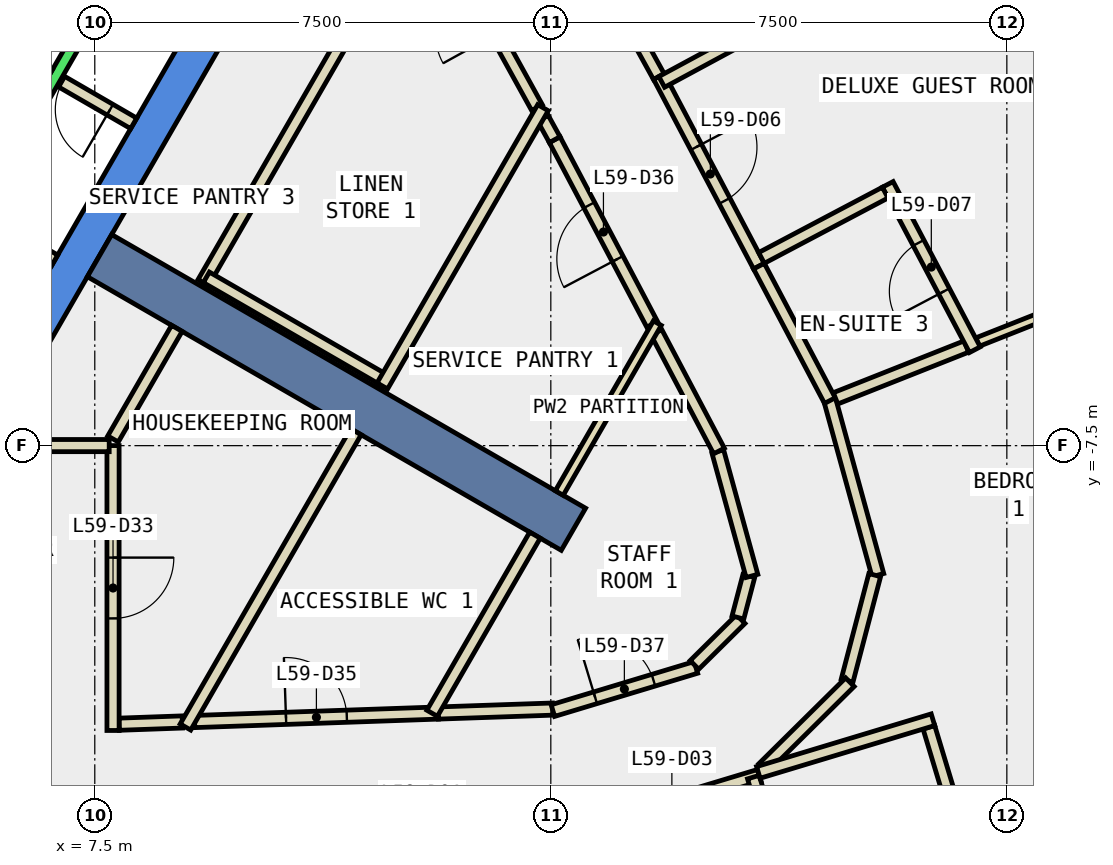
"""IFC4 building model, lengths in metres.
Left out: names, types, materials, properties, quantities, classifications, styles, units other than length and angle.
Written with IfcOpenShell. Run it as: python <this file> out.ifc"""

import sys

from ifc_helpers import new_model, si_unit, direction, frame, frame_2d, origin, origin_2d, place, context, subcontext, project, spatial, polyline, rectangle, outline, extrude, element, fill, save


model = new_model("IFC4")
c1 = context("Model", 3, precision=1e-05, world=origin(), true_north=direction((0.0, 1.0)))
c2 = subcontext(c1, "Body", "Model", "MODEL_VIEW")
j1 = project(units=[si_unit("LENGTHUNIT", "METRE"), si_unit("PLANEANGLEUNIT", "RADIAN")], contexts=[c1])
p1 = place(None, origin())
s1 = spatial("IfcSite", under=j1, at=p1, CompositionType="ELEMENT")
p2 = place(p1, origin())
s2 = spatial("IfcBuilding", under=s1, at=p2, CompositionType="ELEMENT")
p3 = place(p2, frame((0.0, 0.0, 259.4)))
s3 = spatial("IfcBuildingStorey", under=s2, at=p3, CompositionType="ELEMENT", Elevation=259.4)
p4 = place(p3, frame((23.856, -13.774, -0.34), z_axis=(0.0, 0.0, 1.0), x_axis=(-0.866025403784, 0.5, 0.0)))
e1 = element("IfcColumn", 1, at=p4, inside=s3, PredefinedType="COLUMN", context=c2, shape_type="SweptSolid", body=[
    extrude(rectangle(XDim=1.8, YDim=1.8, at=origin_2d()), origin(), (0.0, 0.0, 1.0), 3.6),
])
p5 = place(p3, frame((0.0, 0.0, -0.34)))
e2 = element("IfcWall", 2, at=p5, inside=s3, PredefinedType="SHEAR", context=c2, shape_type="SweptSolid", body=[
    extrude(outline(polyline([(5.774, -7.5), (11.547, 2.5), (10.854, 2.5), (5.427, -6.9), (5.774, -7.5)])), origin(), (0.0, 0.0, 1.0), 3.6),
])
p6 = place(p3, frame((7.578, -4.375, -0.34), z_axis=(0.0, 0.0, 1.0), x_axis=(0.866024315419, -0.5000018851, 0.0)))
e3 = element("IfcWall", 3, at=p6, inside=s3, PredefinedType="SHEAR", context=c2, shape_type="SweptSolid", body=[
    extrude(rectangle(XDim=9.0, YDim=0.8, at=frame_2d((4.5, 0.0))), origin(), (0.0, 0.0, 1.0), 3.6),
])
p7 = place(p3, frame((25.012, -4.07, 0.0), z_axis=(0.0, 0.0, 1.0), x_axis=(-0.466663589714, 0.884434900959, 0.0)))
e4 = element("IfcWall", 4, at=p7, inside=s3, PredefinedType="STANDARD", context=c2, shape_type="SweptSolid", body=[
    extrude(rectangle(XDim=5.638, YDim=0.3, at=frame_2d((2.819, 0.0))), origin(), (0.0, 0.0, 1.0), 3.26),
])
p8 = place(p7, frame((0.459, 0.0, 0.9)))
e5 = element("IfcOpeningElement", 5, at=p8, cuts=e4, PredefinedType="OPENING", context=c2, shape_type="SweptSolid", body=[
    extrude(rectangle(XDim=1.9, YDim=2.0, at=frame_2d((0.95, 1.0))), frame((0.0, 0.16, 0.0), z_axis=(0.0, -1.0, 0.0), x_axis=(1.0, 0.0, 0.0)), (0.0, 0.0, 1.0), 0.32),
])
p9 = place(p7, frame((3.278, 0.0, 0.9)))
e6 = element("IfcOpeningElement", 6, at=p9, cuts=e4, PredefinedType="OPENING", context=c2, shape_type="SweptSolid", body=[
    extrude(rectangle(XDim=1.9, YDim=2.0, at=frame_2d((0.95, 1.0))), frame((0.0, 0.16, 0.0), z_axis=(0.0, -1.0, 0.0), x_axis=(1.0, 0.0, 0.0)), (0.0, 0.0, 1.0), 0.32),
])
p10 = place(p3, frame((7.9, -12.081, 0.0), z_axis=(0.0, 0.0, 1.0), x_axis=(0.999365240621, 0.035624652105, 0.0)))
e7 = element("IfcWall", 7, at=p10, inside=s3, PredefinedType="PARTITIONING", context=c2, shape_type="SweptSolid", body=[
    extrude(rectangle(XDim=1.042, YDim=0.2, at=frame_2d((0.521, 0.0))), origin(), (0.0, 0.0, 1.0), 3.26),
])
p11 = place(p3, frame((14.773, -1.941, 0.0), z_axis=(0.0, 0.0, 1.0), x_axis=(-0.483431586589, 0.875382145744, 0.0)))
e8 = element("IfcWall", 8, at=p11, inside=s3, PredefinedType="PARTITIONING", context=c2, shape_type="SweptSolid", body=[
    extrude(rectangle(XDim=3.771, YDim=0.2, at=frame_2d((1.885, 0.0))), origin(), (0.0, 0.0, 1.0), 3.26),
])
p12 = place(p11, frame((1.385, 0.0, 0.0)))
e9 = element("IfcOpeningElement", 9, at=p12, cuts=e8, PredefinedType="OPENING", context=c2, shape_type="SweptSolid", body=[
    extrude(rectangle(XDim=1.0, YDim=2.1, at=frame_2d((0.5, 1.05))), frame((0.0, 0.11, 0.0), z_axis=(0.0, -1.0, 0.0), x_axis=(1.0, 0.0, 0.0)), (0.0, 0.0, 1.0), 0.22),
])
p13 = place(p3, frame((9.141, -12.037, 0.0), z_axis=(0.0, 0.0, 1.0), x_axis=(0.999388955878, 0.034953038062, 0.0)))
e10 = element("IfcWall", 10, at=p13, inside=s3, PredefinedType="PARTITIONING", context=c2, shape_type="SweptSolid", body=[
    extrude(rectangle(XDim=4.009, YDim=0.2, at=frame_2d((2.005, 0.0))), origin(), (0.0, 0.0, 1.0), 3.26),
])
p14 = place(p13, frame((1.505, 0.0, 0.0)))
e11 = element("IfcOpeningElement", 11, at=p14, cuts=e10, PredefinedType="OPENING", context=c2, shape_type="SweptSolid", body=[
    extrude(rectangle(XDim=1.0, YDim=2.1, at=frame_2d((0.5, 1.05))), frame((0.0, 0.11, 0.0), z_axis=(0.0, -1.0, 0.0), x_axis=(1.0, 0.0, 0.0)), (0.0, 0.0, 1.0), 0.22),
])
p15 = place(p3, frame((16.667, -5.505, 0.0), z_axis=(0.0, 0.0, 1.0), x_axis=(-0.466812680399, 0.884356218624, 0.0)))
e12 = element("IfcWall", 12, at=p15, inside=s3, PredefinedType="PARTITIONING", context=c2, shape_type="SweptSolid", body=[
    extrude(rectangle(XDim=3.434, YDim=0.2, at=frame_2d((1.717, 0.0))), origin(), (0.0, 0.0, 1.0), 3.26),
])
p16 = place(p15, frame((1.217, 0.0, 0.0)))
e13 = element("IfcOpeningElement", 13, at=p16, cuts=e12, PredefinedType="OPENING", context=c2, shape_type="SweptSolid", body=[
    extrude(rectangle(XDim=1.0, YDim=2.1, at=frame_2d((0.5, 1.05))), frame((0.0, 0.11, 0.0), z_axis=(0.0, -1.0, 0.0), x_axis=(1.0, 0.0, 0.0)), (0.0, 0.0, 1.0), 0.22),
])
p17 = place(p3, frame((15.064, -2.468, 0.0), z_axis=(0.0, 0.0, 1.0), x_axis=(-0.482338449744, 0.875984942735, 0.0)))
e14 = element("IfcWall", 14, at=p17, inside=s3, PredefinedType="PARTITIONING", context=c2, shape_type="SweptSolid", body=[
    extrude(rectangle(XDim=0.402, YDim=0.2, at=frame_2d((0.201, 0.0))), origin(), (0.0, 0.0, 1.0), 3.26),
])
p18 = place(p3, frame((13.148, -11.897, 0.0), z_axis=(0.0, 0.0, 1.0), x_axis=(0.999405229262, 0.034484601243, 0.0)))
e15 = element("IfcWall", 15, at=p18, inside=s3, PredefinedType="PARTITIONING", context=c2, shape_type="SweptSolid", body=[
    extrude(rectangle(XDim=1.883, YDim=0.2, at=frame_2d((0.942, 0.0))), origin(), (0.0, 0.0, 1.0), 3.26),
])
p19 = place(p3, frame((15.034, -11.857, 0.0), z_axis=(0.0, 0.0, 1.0), x_axis=(0.957338084933, 0.288970225346, 0.0)))
e16 = element("IfcWall", 16, at=p19, inside=s3, PredefinedType="PARTITIONING", context=c2, shape_type="SweptSolid", body=[
    extrude(rectangle(XDim=2.457, YDim=0.2, at=frame_2d((1.229, 0.0))), origin(), (0.0, 0.0, 1.0), 3.26),
])
p20 = place(p19, frame((0.728, 0.0, 0.0)))
e17 = element("IfcOpeningElement", 17, at=p20, cuts=e16, PredefinedType="OPENING", context=c2, shape_type="SweptSolid", body=[
    extrude(rectangle(XDim=1.0, YDim=2.1, at=frame_2d((0.5, 1.05))), frame((0.0, 0.11, 0.0), z_axis=(0.0, -1.0, 0.0), x_axis=(1.0, 0.0, 0.0)), (0.0, 0.0, 1.0), 0.22),
])
p21 = place(p3, frame((17.362, -11.106, 0.0), z_axis=(0.0, 0.0, 1.0), x_axis=(0.710859741153, 0.703333795866, 0.0)))
e18 = element("IfcWall", 18, at=p21, inside=s3, PredefinedType="PARTITIONING", context=c2, shape_type="SweptSolid", body=[
    extrude(rectangle(XDim=1.071, YDim=0.2, at=frame_2d((0.535, 0.0))), origin(), (0.0, 0.0, 1.0), 3.26),
])
p22 = place(p3, frame((18.077, -10.326, 0.0), z_axis=(0.0, 0.0, 1.0), x_axis=(0.254782174857, 0.966998471237, 0.0)))
e19 = element("IfcWall", 19, at=p22, inside=s3, PredefinedType="PARTITIONING", context=c2, shape_type="SweptSolid", body=[
    extrude(rectangle(XDim=0.707, YDim=0.2, at=frame_2d((0.354, 0.0))), origin(), (0.0, 0.0, 1.0), 3.26),
])
p23 = place(p3, frame((18.308, -9.642, 0.0), z_axis=(0.0, 0.0, 1.0), x_axis=(-0.264859637197, 0.96428697626, 0.0)))
e20 = element("IfcWall", 20, at=p23, inside=s3, PredefinedType="PARTITIONING", context=c2, shape_type="SweptSolid", body=[
    extrude(rectangle(XDim=2.122, YDim=0.2, at=frame_2d((1.061, 0.0))), origin(), (0.0, 0.0, 1.0), 3.26),
])
p24 = place(p3, frame((17.766, -7.588, 0.0), z_axis=(0.0, 0.0, 1.0), x_axis=(-0.466727344864, 0.884401258228, 0.0)))
e21 = element("IfcWall", 21, at=p24, inside=s3, PredefinedType="PARTITIONING", context=c2, shape_type="SweptSolid", body=[
    extrude(rectangle(XDim=2.205, YDim=0.2, at=frame_2d((1.103, 0.0))), origin(), (0.0, 0.0, 1.0), 3.26),
])
p25 = place(p3, frame((18.427, -12.922, 0.0), z_axis=(0.0, 0.0, 1.0), x_axis=(-0.957336631432, -0.288975040651, 0.0)))
e22 = element("IfcWall", 22, at=p25, inside=s3, PredefinedType="PARTITIONING", context=c2, shape_type="SweptSolid", body=[
    extrude(rectangle(XDim=3.0, YDim=0.2, at=frame_2d((1.5, 0.0))), origin(), (0.0, 0.0, 1.0), 3.26),
])
p26 = place(p25, frame((1.0, 0.0, 0.0)))
e23 = element("IfcOpeningElement", 23, at=p26, cuts=e22, PredefinedType="OPENING", context=c2, shape_type="SweptSolid", body=[
    extrude(rectangle(XDim=1.0, YDim=2.1, at=frame_2d((0.5, 1.05))), frame((0.0, 0.11, 0.0), z_axis=(0.0, -1.0, 0.0), x_axis=(1.0, 0.0, 0.0)), (0.0, 0.0, 1.0), 0.22),
])
p27 = place(p3, frame((19.564, -6.662, 0.0), z_axis=(0.0, 0.0, 1.0), x_axis=(0.264876135597, -0.96428244451, 0.0)))
e24 = element("IfcWall", 24, at=p27, inside=s3, PredefinedType="PARTITIONING", context=c2, shape_type="SweptSolid", body=[
    extrude(rectangle(XDim=3.077, YDim=0.2, at=frame_2d((1.538, 0.0))), origin(), (0.0, 0.0, 1.0), 3.26),
])
p28 = place(p3, frame((20.327, -9.629, 0.0), z_axis=(0.0, 0.0, 1.0), x_axis=(-0.253192482031, -0.967415922467, 0.0)))
e25 = element("IfcWall", 25, at=p28, inside=s3, PredefinedType="PARTITIONING", context=c2, shape_type="SweptSolid", body=[
    extrude(rectangle(XDim=1.792, YDim=0.2, at=frame_2d((0.896, 0.0))), origin(), (0.0, 0.0, 1.0), 3.26),
])
p29 = place(p3, frame((19.919, -11.39, 0.0), z_axis=(0.0, 0.0, 1.0), x_axis=(-0.71104667794, -0.70314480855, 0.0)))
e26 = element("IfcWall", 26, at=p29, inside=s3, PredefinedType="PARTITIONING", context=c2, shape_type="SweptSolid", body=[
    extrude(rectangle(XDim=2.008, YDim=0.2, at=frame_2d((1.004, 0.0))), origin(), (0.0, 0.0, 1.0), 3.26),
])
p30 = place(p3, frame((16.778, -1.429, 0.0), z_axis=(0.0, 0.0, 1.0), x_axis=(0.466493865945, -0.884524433261, 0.0)))
e27 = element("IfcWall", 27, at=p30, inside=s3, PredefinedType="PARTITIONING", context=c2, shape_type="SweptSolid", body=[
    extrude(rectangle(XDim=3.526, YDim=0.2, at=frame_2d((1.763, 0.0))), origin(), (0.0, 0.0, 1.0), 3.26),
])
p31 = place(p30, frame((1.313, 0.0, 0.0)))
e28 = element("IfcOpeningElement", 28, at=p31, cuts=e27, PredefinedType="OPENING", context=c2, shape_type="SweptSolid", body=[
    extrude(rectangle(XDim=1.0, YDim=2.1, at=frame_2d((0.5, 1.05))), frame((0.0, 0.11, 0.0), z_axis=(0.0, -1.0, 0.0), x_axis=(1.0, 0.0, 0.0)), (0.0, 0.0, 1.0), 0.22),
])
p32 = place(p3, frame((18.423, -4.548, 0.0), z_axis=(0.0, 0.0, 1.0), x_axis=(0.466792565793, -0.884366835946, 0.0)))
e29 = element("IfcWall", 29, at=p32, inside=s3, PredefinedType="PARTITIONING", context=c2, shape_type="SweptSolid", body=[
    extrude(rectangle(XDim=2.5, YDim=0.2, at=frame_2d((1.25, 0.0))), origin(), (0.0, 0.0, 1.0), 3.26),
])
p33 = place(p3, frame((15.715, 0.491, 0.0), z_axis=(0.0, 0.0, 1.0), x_axis=(0.483421428323, -0.875387755591, 0.0)))
e30 = element("IfcWall", 30, at=p33, inside=s3, PredefinedType="PARTITIONING", context=c2, shape_type="SweptSolid", body=[
    extrude(rectangle(XDim=2.194, YDim=0.2, at=frame_2d((1.097, 0.0))), origin(), (0.0, 0.0, 1.0), 3.26),
])
p34 = place(p3, frame((5.888, -3.902, 0.0), z_axis=(0.0, 0.0, 1.0), x_axis=(0.86621513555, -0.499671230855, 0.0)))
e31 = element("IfcWall", 31, at=p34, inside=s3, PredefinedType="PARTITIONING", context=c2, shape_type="SweptSolid", body=[
    extrude(rectangle(XDim=1.1, YDim=0.2, at=frame_2d((0.55, 0.0))), origin(), (0.0, 0.0, 1.0), 3.26),
])
p35 = place(p3, frame((8.14, -2.2, 0.0), z_axis=(0.0, 0.0, 1.0), x_axis=(-0.865545166185, 0.500830874941, 0.0)))
e32 = element("IfcWall", 32, at=p35, inside=s3, PredefinedType="PARTITIONING", context=c2, shape_type="SweptSolid", body=[
    extrude(rectangle(XDim=1.5, YDim=0.2, at=frame_2d((0.75, 0.0))), origin(), (0.0, 0.0, 1.0), 3.26),
])
p36 = place(p35, frame((0.45, 0.0, 0.0)))
e33 = element("IfcOpeningElement", 33, at=p36, cuts=e32, PredefinedType="OPENING", context=c2, shape_type="SweptSolid", body=[
    extrude(rectangle(XDim=0.9, YDim=2.1, at=frame_2d((0.45, 1.05))), frame((0.0, 0.11, 0.0), z_axis=(0.0, -1.0, 0.0), x_axis=(1.0, 0.0, 0.0)), (0.0, 0.0, 1.0), 0.22),
])
p37 = place(p3, frame((7.8, -7.39, 0.0), z_axis=(0.0, 0.0, 1.0), x_axis=(0.499977374825, 0.866038466041, 0.0)))
e34 = element("IfcWall", 34, at=p37, inside=s3, PredefinedType="PARTITIONING", context=c2, shape_type="SweptSolid", body=[
    extrude(rectangle(XDim=2.1, YDim=0.2, at=frame_2d((1.05, 0.0))), origin(), (0.0, 0.0, 1.0), 3.26),
])
p38 = place(p3, frame((9.285, -4.818, 0.0), z_axis=(0.0, 0.0, 1.0), x_axis=(0.499962569651, 0.866047013128, 0.0)))
e35 = element("IfcWall", 35, at=p38, inside=s3, PredefinedType="PARTITIONING", context=c2, shape_type="SweptSolid", body=[
    extrude(rectangle(XDim=7.334, YDim=0.2, at=frame_2d((3.667, 0.0))), origin(), (0.0, 0.0, 1.0), 3.26),
])
p39 = place(p3, frame((7.8, -7.499, 0.0), z_axis=(0.0, 0.0, 1.0), x_axis=(0.0, -1.0, 0.0)))
e36 = element("IfcWall", 36, at=p39, inside=s3, PredefinedType="PARTITIONING", context=c2, shape_type="SweptSolid", body=[
    extrude(rectangle(XDim=4.685, YDim=0.2, at=frame_2d((2.343, 0.0))), origin(), (0.0, 0.0, 1.0), 3.26),
])
p40 = place(p39, frame((1.842, 0.0, 0.0)))
e37 = element("IfcOpeningElement", 37, at=p40, cuts=e36, PredefinedType="OPENING", context=c2, shape_type="SweptSolid", body=[
    extrude(rectangle(XDim=1.0, YDim=2.1, at=frame_2d((0.5, 1.05))), frame((0.0, 0.11, 0.0), z_axis=(0.0, -1.0, 0.0), x_axis=(1.0, 0.0, 0.0)), (0.0, 0.0, 1.0), 0.22),
])
p41 = place(p3, frame((9.335, -4.732, 0.0), z_axis=(0.0, 0.0, 1.0), x_axis=(0.866002606077, -0.500039484709, 0.0)))
e38 = element("IfcWall", 38, at=p41, inside=s3, PredefinedType="PARTITIONING", context=c2, shape_type="SweptSolid", body=[
    extrude(rectangle(XDim=3.4, YDim=0.2, at=frame_2d((1.7, 0.0))), origin(), (0.0, 0.0, 1.0), 3.26),
])
p42 = place(p3, frame((11.794, -7.271, 0.0), z_axis=(0.0, 0.0, 1.0), x_axis=(-0.499918457185, -0.866072477433, 0.0)))
e39 = element("IfcWall", 39, at=p42, inside=s3, PredefinedType="PARTITIONING", context=c2, shape_type="SweptSolid", body=[
    extrude(rectangle(XDim=5.607, YDim=0.2, at=frame_2d((2.803, 0.0))), origin(), (0.0, 0.0, 1.0), 3.26),
])
p43 = place(p3, frame((14.871, -1.942, 0.0), z_axis=(0.0, 0.0, 1.0), x_axis=(-0.50000507839, -0.866022471755, 0.0)))
e40 = element("IfcWall", 40, at=p43, inside=s3, PredefinedType="PARTITIONING", context=c2, shape_type="SweptSolid", body=[
    extrude(rectangle(XDim=5.284, YDim=0.2, at=frame_2d((2.642, 0.0))), origin(), (0.0, 0.0, 1.0), 3.26),
])
p44 = place(p3, frame((14.739, -8.972, 0.0), z_axis=(0.0, 0.0, 1.0), x_axis=(-0.499974489635, -0.8660401317, 0.0)))
e41 = element("IfcWall", 41, at=p44, inside=s3, PredefinedType="PARTITIONING", context=c2, shape_type="SweptSolid", body=[
    extrude(rectangle(XDim=3.382, YDim=0.2, at=frame_2d((1.691, 0.0))), origin(), (0.0, 0.0, 1.0), 3.26),
])
p45 = place(p3, frame((16.752, -5.485, 0.0), z_axis=(0.0, 0.0, 1.0), x_axis=(-0.499988848364, -0.866031842089, 0.0)))
e42 = element("IfcWall", 42, at=p45, inside=s3, PredefinedType="PARTITIONING", context=c2, shape_type="SweptSolid", body=[
    extrude(rectangle(XDim=3.226, YDim=0.15, at=frame_2d((1.613, 0.0))), origin(), (0.0, 0.0, 1.0), 3.26),
])
p46 = place(p3, frame((18.331, -12.951, 0.0), z_axis=(0.0, 0.0, 1.0), x_axis=(0.289175152117, -0.957276204341, 0.0)))
e43 = element("IfcWall", 43, at=p46, inside=s3, PredefinedType="PARTITIONING", context=c2, shape_type="SweptSolid", body=[
    extrude(rectangle(XDim=2.5, YDim=0.2, at=frame_2d((1.25, 0.0))), origin(), (0.0, 0.0, 1.0), 3.26),
])
p47 = place(p3, frame((21.926, -14.478, 0.0), z_axis=(0.0, 0.0, 1.0), x_axis=(-0.288928787246, 0.957350591947, 0.0)))
e44 = element("IfcWall", 44, at=p47, inside=s3, PredefinedType="PARTITIONING", context=c2, shape_type="SweptSolid", body=[
    extrude(rectangle(XDim=2.45, YDim=0.2, at=frame_2d((1.225, 0.0))), origin(), (0.0, 0.0, 1.0), 3.26),
])
p48 = place(p3, frame((21.285, -12.007, 0.0), z_axis=(0.0, 0.0, 1.0), x_axis=(-0.957329834998, -0.288997555392, 0.0)))
e45 = element("IfcWall", 45, at=p48, inside=s3, PredefinedType="PARTITIONING", context=c2, shape_type="SweptSolid", body=[
    extrude(rectangle(XDim=3.0, YDim=0.2, at=frame_2d((1.5, 0.0))), origin(), (0.0, 0.0, 1.0), 3.26),
])
p49 = place(p3, frame((22.02, -5.796, 0.0), z_axis=(0.0, 0.0, 1.0), x_axis=(0.929915172208, 0.367774078066, 0.0)))
e46 = element("IfcWall", 46, at=p49, inside=s3, PredefinedType="PARTITIONING", context=c2, shape_type="SweptSolid", body=[
    extrude(rectangle(XDim=2.003, YDim=0.15, at=frame_2d((1.002, 0.0))), origin(), (0.0, 0.0, 1.0), 3.26),
])
p50 = place(p3, frame((19.683, -6.722, 0.0), z_axis=(0.0, 0.0, 1.0), x_axis=(0.929744903847, 0.368204309821, 0.0)))
e47 = element("IfcWall", 47, at=p50, inside=s3, PredefinedType="PARTITIONING", context=c2, shape_type="SweptSolid", body=[
    extrude(rectangle(XDim=2.313, YDim=0.2, at=frame_2d((1.157, 0.0))), origin(), (0.0, 0.0, 1.0), 3.26),
])
p51 = place(p3, frame((21.974, -5.922, 0.0), z_axis=(0.0, 0.0, 1.0), x_axis=(-0.466401249432, 0.88457327256, 0.0)))
e48 = element("IfcWall", 48, at=p51, inside=s3, PredefinedType="PARTITIONING", context=c2, shape_type="SweptSolid", body=[
    extrude(rectangle(XDim=3.073, YDim=0.2, at=frame_2d((1.536, 0.0))), origin(), (0.0, 0.0, 1.0), 3.26),
])
p52 = place(p51, frame((1.086, 0.0, 0.0)))
e49 = element("IfcOpeningElement", 49, at=p52, cuts=e48, PredefinedType="OPENING", context=c2, shape_type="SweptSolid", body=[
    extrude(rectangle(XDim=0.9, YDim=2.1, at=frame_2d((0.45, 1.05))), frame((0.0, 0.11, 0.0), z_axis=(0.0, -1.0, 0.0), x_axis=(1.0, 0.0, 0.0)), (0.0, 0.0, 1.0), 0.22),
])
p53 = place(p3, frame((20.499, -3.339, 0.0), z_axis=(0.0, 0.0, 1.0), x_axis=(-0.884293452572, -0.466931568583, 0.0)))
e50 = element("IfcWall", 50, at=p53, inside=s3, PredefinedType="PARTITIONING", context=c2, shape_type="SweptSolid", body=[
    extrude(rectangle(XDim=2.3, YDim=0.2, at=frame_2d((1.15, 0.0))), origin(), (0.0, 0.0, 1.0), 3.26),
])
p54 = place(p3, frame((16.824, -1.518, 0.0), z_axis=(0.0, 0.0, 1.0), x_axis=(0.87996932648, 0.475030508972, 0.0)))
e51 = element("IfcWall", 51, at=p54, inside=s3, PredefinedType="PARTITIONING", context=c2, shape_type="SweptSolid", body=[
    extrude(rectangle(XDim=2.299, YDim=0.2, at=frame_2d((1.149, 0.0))), origin(), (0.0, 0.0, 1.0), 3.26),
])
p55 = place(p3, frame((5.944, -7.499, 0.0), z_axis=(0.0, 0.0, 1.0), x_axis=(1.0, 0.0, 0.0)))
e52 = element("IfcWall", 52, at=p55, inside=s3, PredefinedType="PARTITIONING", context=c2, shape_type="SweptSolid", body=[
    extrude(rectangle(XDim=1.793, YDim=0.2, at=frame_2d((0.896, 0.0))), origin(), (0.0, 0.0, 1.0), 3.26),
])
p56 = place(p3, frame((5.492, -3.788, 0.0), z_axis=(0.0, 0.0, 1.0), x_axis=(0.500034260056, 0.866005622828, 0.0)))
e53 = element("IfcWall", 53, at=p56, inside=s3, PredefinedType="STANDARD", context=c2, shape_type="SweptSolid", body=[
    extrude(rectangle(XDim=5.399, YDim=0.2, at=frame_2d((2.7, 0.0))), origin(), (0.0, 0.0, 1.0), 3.26),
])
p57 = place(p3, frame((4.677, -0.2, 0.0), z_axis=(0.0, 0.0, 1.0), x_axis=(0.865973769406, -0.500089422704, 0.0)))
e54 = element("IfcWall", 54, at=p57, inside=s3, PredefinedType="STANDARD", context=c2, shape_type="SweptSolid", body=[
    extrude(rectangle(XDim=2.399, YDim=0.2, at=frame_2d((1.2, 0.0))), origin(), (0.0, 0.0, 1.0), 3.26),
])
p58 = place(p9, origin())
e55 = element("IfcWindow", 55, at=p58, inside=s3, PartitioningType="SINGLE_PANEL", PredefinedType="WINDOW", context=c2, shape_type="SweptSolid", body=[
    extrude(rectangle(XDim=1.9, YDim=2.0, at=frame_2d((0.95, 1.0))), frame((0.0, 0.03, 0.0), z_axis=(0.0, -1.0, 0.0), x_axis=(1.0, 0.0, 0.0)), (0.0, 0.0, 1.0), 0.06),
])
fill(e6, e55)
p59 = place(p31, origin())
e56 = element("IfcDoor", 56, at=p59, inside=s3, OperationType="SINGLE_SWING_RIGHT", PredefinedType="DOOR", context=c2, shape_type="SweptSolid", body=[
    extrude(rectangle(XDim=1.0, YDim=2.1, at=frame_2d((0.5, 1.05))), frame((0.0, 0.025, 0.0), z_axis=(0.0, -1.0, 0.0), x_axis=(1.0, 0.0, 0.0)), (0.0, 0.0, 1.0), 0.05),
])
fill(e28, e56)
p60 = place(p52, origin())
e57 = element("IfcDoor", 57, at=p60, inside=s3, OperationType="SINGLE_SWING_RIGHT", PredefinedType="DOOR", context=c2, shape_type="SweptSolid", body=[
    extrude(rectangle(XDim=0.9, YDim=2.1, at=frame_2d((0.45, 1.05))), frame((0.0, 0.025, 0.0), z_axis=(0.0, -1.0, 0.0), x_axis=(1.0, 0.0, 0.0)), (0.0, 0.0, 1.0), 0.05),
])
fill(e49, e57)
p61 = place(p40, origin())
e58 = element("IfcDoor", 58, at=p61, inside=s3, OperationType="SINGLE_SWING_LEFT", PredefinedType="DOOR", context=c2, shape_type="SweptSolid", body=[
    extrude(rectangle(XDim=1.0, YDim=2.1, at=frame_2d((0.5, 1.05))), frame((0.0, 0.025, 0.0), z_axis=(0.0, -1.0, 0.0), x_axis=(1.0, 0.0, 0.0)), (0.0, 0.0, 1.0), 0.05),
])
fill(e37, e58)
p62 = place(p14, origin())
e59 = element("IfcDoor", 59, at=p62, inside=s3, OperationType="SINGLE_SWING_LEFT", PredefinedType="DOOR", context=c2, shape_type="SweptSolid", body=[
    extrude(rectangle(XDim=1.0, YDim=2.1, at=frame_2d((0.5, 1.05))), frame((0.0, 0.025, 0.0), z_axis=(0.0, -1.0, 0.0), x_axis=(1.0, 0.0, 0.0)), (0.0, 0.0, 1.0), 0.05),
])
fill(e11, e59)
p63 = place(p16, origin())
e60 = element("IfcDoor", 60, at=p63, inside=s3, OperationType="SINGLE_SWING_RIGHT", PredefinedType="DOOR", context=c2, shape_type="SweptSolid", body=[
    extrude(rectangle(XDim=1.0, YDim=2.1, at=frame_2d((0.5, 1.05))), frame((0.0, 0.025, 0.0), z_axis=(0.0, -1.0, 0.0), x_axis=(1.0, 0.0, 0.0)), (0.0, 0.0, 1.0), 0.05),
])
fill(e13, e60)
p64 = place(p20, origin())
e61 = element("IfcDoor", 61, at=p64, inside=s3, OperationType="SINGLE_SWING_LEFT", PredefinedType="DOOR", context=c2, shape_type="SweptSolid", body=[
    extrude(rectangle(XDim=1.0, YDim=2.1, at=frame_2d((0.5, 1.05))), frame((0.0, 0.025, 0.0), z_axis=(0.0, -1.0, 0.0), x_axis=(1.0, 0.0, 0.0)), (0.0, 0.0, 1.0), 0.05),
])
fill(e17, e61)
p65 = place(p36, origin())
e62 = element("IfcDoor", 62, at=p65, inside=s3, OperationType="SINGLE_SWING_LEFT", PredefinedType="DOOR", context=c2, shape_type="SweptSolid", body=[
    extrude(rectangle(XDim=0.9, YDim=2.1, at=frame_2d((0.45, 1.05))), frame((0.0, 0.025, 0.0), z_axis=(0.0, -1.0, 0.0), x_axis=(1.0, 0.0, 0.0)), (0.0, 0.0, 1.0), 0.05),
])
fill(e33, e62)
save(model, sys.argv[1])
